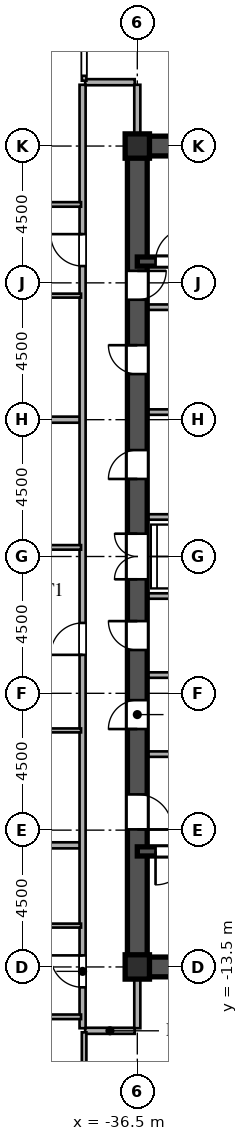
"""IFC4 building model, lengths in metres.
Left out: names, types, materials, properties, quantities, classifications, styles, units other than length and angle.
Written with IfcOpenShell. Run it as: python <this file> out.ifc"""

import sys

from ifc_helpers import new_model, si_unit, direction, frame, frame_2d, origin, origin_2d, place, context, subcontext, project, spatial, rectangle, i_section, extrude, source, transform, mapped, element, fill, save


model = new_model("IFC4")
c1 = context("Model", 3, precision=1e-05, world=origin(), true_north=direction((0.0, 1.0)))
c2 = subcontext(c1, "Body", "Model", "MODEL_VIEW")
j1 = project(units=[si_unit("LENGTHUNIT", "METRE"), si_unit("PLANEANGLEUNIT", "RADIAN")], contexts=[c1])
p1 = place(None, origin())
s1 = spatial("IfcSite", under=j1, at=p1, CompositionType="ELEMENT")
p2 = place(p1, origin())
s2 = spatial("IfcBuilding", under=s1, at=p2, CompositionType="ELEMENT")
p3 = place(p2, frame((0.0, 0.0, 72.9)))
s3 = spatial("IfcBuildingStorey", under=s2, at=p3, CompositionType="ELEMENT", Elevation=72.9)
m1 = source(origin(), c2, "Body", "SweptSolid", [
    extrude(i_section(OverallWidth=0.8, OverallDepth=0.8, WebThickness=0.032, FlangeThickness=0.05, at=origin_2d()), origin(), (0.0, 0.0, 1.0), 3.6),
])
for number, where, z_axis, x_axis in (
    (1, (-36.5, -13.5, 0.0), (0.0, 0.0, 1.0), (1.0, 0.0, 0.0)),
    (2, (-36.5, 13.5, 0.0), (0.0, 0.0, 1.0), (1.0, 0.0, 0.0)),
):
    element("IfcColumn", number, at=place(p3, frame(where, z_axis=z_axis, x_axis=x_axis)), inside=s3, PredefinedType="COLUMN", context=c2, shape_type="MappedRepresentation", body=[
        mapped(m1, transform((0.0, 0.0, 0.0), scale=1.0)),
    ])
for number, where, z_axis, x_axis in (
    (3, (-36.5, -13.5, 0.0), (0.0, 0.0, 1.0), (1.0, 0.0, 0.0)),
    (4, (-36.5, 13.5, 0.0), (0.0, 0.0, 1.0), (1.0, 0.0, 0.0)),
):
    element("IfcWall", number, at=place(p3, frame(where, z_axis=z_axis, x_axis=x_axis)), inside=s3, PredefinedType="SHEAR", context=c2, shape_type="SweptSolid", body=[
        extrude(rectangle(XDim=9.0, YDim=0.65, at=frame_2d((4.5, 0.0))), origin(), (0.0, 0.0, 1.0), 3.38),
    ])
p4 = place(p3, frame((-36.5, -13.65, 0.0), z_axis=(0.0, 0.0, 1.0), x_axis=(0.0, 1.0, 0.0)))
e5 = element("IfcWall", 5, at=p4, inside=s3, PredefinedType="SHEAR", context=c2, shape_type="SweptSolid", body=[
    extrude(rectangle(XDim=7.15, YDim=0.65, at=frame_2d((3.575, 0.0))), origin(), (0.0, 0.0, 1.0), 3.38),
])
p5 = place(p4, frame((4.675, 0.0, 0.0)))
e6 = element("IfcOpeningElement", 6, at=p5, cuts=e5, PredefinedType="OPENING", context=c2, shape_type="SweptSolid", body=[
    extrude(rectangle(XDim=1.15, YDim=2.2, at=frame_2d((0.575, 1.1))), frame((0.0, 0.335, 0.0), z_axis=(0.0, -1.0, 0.0), x_axis=(1.0, 0.0, 0.0)), (0.0, 0.0, 1.0), 0.67),
])
p6 = place(p3, frame((-36.5, -1.3, 0.0), z_axis=(0.0, 0.0, 1.0), x_axis=(0.0, 1.0, 0.0)))
e7 = element("IfcWall", 7, at=p6, inside=s3, PredefinedType="SHEAR", context=c2, shape_type="SweptSolid", body=[
    extrude(rectangle(XDim=2.6, YDim=0.65, at=frame_2d((1.3, 0.0))), origin(), (0.0, 0.0, 1.0), 3.38),
])
p7 = place(p6, frame((0.55, 0.0, 0.0)))
e8 = element("IfcOpeningElement", 8, at=p7, cuts=e7, PredefinedType="OPENING", context=c2, shape_type="SweptSolid", body=[
    extrude(rectangle(XDim=1.5, YDim=2.3, at=frame_2d((0.75, 1.15))), frame((0.0, 0.335, 0.0), z_axis=(0.0, -1.0, 0.0), x_axis=(1.0, 0.0, 0.0)), (0.0, 0.0, 1.0), 0.67),
])
p8 = place(p3, frame((-36.5, 8.2, 0.0), z_axis=(0.0, 0.0, 1.0), x_axis=(0.0, 1.0, 0.0)))
e9 = element("IfcWall", 9, at=p8, inside=s3, PredefinedType="SHEAR", context=c2, shape_type="SweptSolid", body=[
    extrude(rectangle(XDim=5.45, YDim=0.65, at=frame_2d((2.725, 0.0))), origin(), (0.0, 0.0, 1.0), 3.38),
])
p9 = place(p8, frame((0.245, 0.0, 0.0)))
e10 = element("IfcOpeningElement", 10, at=p9, cuts=e9, PredefinedType="OPENING", context=c2, shape_type="SweptSolid", body=[
    extrude(rectangle(XDim=0.95, YDim=2.15, at=frame_2d((0.475, 1.075))), frame((0.0, 0.335, 0.0), z_axis=(0.0, -1.0, 0.0), x_axis=(1.0, 0.0, 0.0)), (0.0, 0.0, 1.0), 0.67),
])
p10 = place(p3, frame((-36.5, -6.5, 0.0), z_axis=(0.0, 0.0, 1.0), x_axis=(0.0, 1.0, 0.0)))
e11 = element("IfcWall", 11, at=p10, inside=s3, PredefinedType="SHEAR", context=c2, shape_type="SweptSolid", body=[
    extrude(rectangle(XDim=2.6, YDim=0.65, at=frame_2d((1.3, 0.0))), origin(), (0.0, 0.0, 1.0), 3.38),
])
p11 = place(p10, frame((0.825, 0.0, 0.0)))
e12 = element("IfcOpeningElement", 12, at=p11, cuts=e11, PredefinedType="OPENING", context=c2, shape_type="SweptSolid", body=[
    extrude(rectangle(XDim=0.95, YDim=2.15, at=frame_2d((0.475, 1.075))), frame((0.0, 0.335, 0.0), z_axis=(0.0, -1.0, 0.0), x_axis=(1.0, 0.0, 0.0)), (0.0, 0.0, 1.0), 0.67),
])
p12 = place(p3, frame((-36.5, -3.9, 0.0), z_axis=(0.0, 0.0, 1.0), x_axis=(0.0, 1.0, 0.0)))
e13 = element("IfcWall", 13, at=p12, inside=s3, PredefinedType="SHEAR", context=c2, shape_type="SweptSolid", body=[
    extrude(rectangle(XDim=2.6, YDim=0.65, at=frame_2d((1.3, 0.0))), origin(), (0.0, 0.0, 1.0), 3.38),
])
p13 = place(p12, frame((0.825, 0.0, 0.0)))
e14 = element("IfcOpeningElement", 14, at=p13, cuts=e13, PredefinedType="OPENING", context=c2, shape_type="SweptSolid", body=[
    extrude(rectangle(XDim=0.95, YDim=2.15, at=frame_2d((0.475, 1.075))), frame((0.0, 0.335, 0.0), z_axis=(0.0, -1.0, 0.0), x_axis=(1.0, 0.0, 0.0)), (0.0, 0.0, 1.0), 0.67),
])
p14 = place(p3, frame((-36.5, 1.3, 0.0), z_axis=(0.0, 0.0, 1.0), x_axis=(0.0, 1.0, 0.0)))
e15 = element("IfcWall", 15, at=p14, inside=s3, PredefinedType="SHEAR", context=c2, shape_type="SweptSolid", body=[
    extrude(rectangle(XDim=3.45, YDim=0.65, at=frame_2d((1.725, 0.0))), origin(), (0.0, 0.0, 1.0), 3.38),
])
p15 = place(p14, frame((1.25, 0.0, 0.0)))
e16 = element("IfcOpeningElement", 16, at=p15, cuts=e15, PredefinedType="OPENING", context=c2, shape_type="SweptSolid", body=[
    extrude(rectangle(XDim=0.95, YDim=2.15, at=frame_2d((0.475, 1.075))), frame((0.0, 0.335, 0.0), z_axis=(0.0, -1.0, 0.0), x_axis=(1.0, 0.0, 0.0)), (0.0, 0.0, 1.0), 0.67),
])
p16 = place(p3, frame((-36.5, 4.75, 0.0), z_axis=(0.0, 0.0, 1.0), x_axis=(0.0, 1.0, 0.0)))
e17 = element("IfcWall", 17, at=p16, inside=s3, PredefinedType="SHEAR", context=c2, shape_type="SweptSolid", body=[
    extrude(rectangle(XDim=3.45, YDim=0.65, at=frame_2d((1.725, 0.0))), origin(), (0.0, 0.0, 1.0), 3.38),
])
p17 = place(p16, frame((1.25, 0.0, 0.0)))
e18 = element("IfcOpeningElement", 18, at=p17, cuts=e17, PredefinedType="OPENING", context=c2, shape_type="SweptSolid", body=[
    extrude(rectangle(XDim=0.95, YDim=2.15, at=frame_2d((0.475, 1.075))), frame((0.0, 0.335, 0.0), z_axis=(0.0, -1.0, 0.0), x_axis=(1.0, 0.0, 0.0)), (0.0, 0.0, 1.0), 0.67),
])
p18 = place(p3, frame((-36.5, -9.7, 0.0), z_axis=(0.0, 0.0, 1.0), x_axis=(1.0, 0.0, 0.0)))
e19 = element("IfcWall", 19, at=p18, inside=s3, PredefinedType="SHEAR", context=c2, shape_type="SweptSolid", body=[
    extrude(rectangle(XDim=9.0, YDim=0.3, at=frame_2d((4.5, 0.0))), origin(), (0.0, 0.0, 1.0), 3.38),
])
p19 = place(p18, frame((0.6, 0.0, 0.0)))
e20 = element("IfcOpeningElement", 20, at=p19, cuts=e19, PredefinedType="OPENING", context=c2, shape_type="SweptSolid", body=[
    extrude(rectangle(XDim=1.1, YDim=2.2, at=frame_2d((0.55, 1.1))), frame((0.0, 0.16, 0.0), z_axis=(0.0, -1.0, 0.0), x_axis=(1.0, 0.0, 0.0)), (0.0, 0.0, 1.0), 0.32),
])
p20 = place(p3, frame((-36.5, 9.7, 0.0), z_axis=(0.0, 0.0, 1.0), x_axis=(1.0, 0.0, 0.0)))
e21 = element("IfcWall", 21, at=p20, inside=s3, PredefinedType="SHEAR", context=c2, shape_type="SweptSolid", body=[
    extrude(rectangle(XDim=9.0, YDim=0.3, at=frame_2d((4.5, 0.0))), origin(), (0.0, 0.0, 1.0), 3.38),
])
p21 = place(p20, frame((0.6, 0.0, 0.0)))
e22 = element("IfcOpeningElement", 22, at=p21, cuts=e21, PredefinedType="OPENING", context=c2, shape_type="SweptSolid", body=[
    extrude(rectangle(XDim=1.1, YDim=2.2, at=frame_2d((0.55, 1.1))), frame((0.0, 0.16, 0.0), z_axis=(0.0, -1.0, 0.0), x_axis=(1.0, 0.0, 0.0)), (0.0, 0.0, 1.0), 0.32),
])
for number, where, z_axis, x_axis in (
    (23, (-36.15, -6.5, 0.0), (0.0, 0.0, 1.0), (1.0, 0.0, 0.0)),
    (24, (-36.15, 8.2, 0.0), (0.0, 0.0, 1.0), (1.0, 0.0, 0.0)),
):
    element("IfcWall", number, at=place(p3, frame(where, z_axis=z_axis, x_axis=x_axis)), inside=s3, PredefinedType="PARTITIONING", context=c2, shape_type="SweptSolid", body=[
        extrude(rectangle(XDim=5.7, YDim=0.18, at=frame_2d((2.85, 0.0))), origin(), (0.0, 0.0, 1.0), 3.38),
    ])
for number, where, z_axis, x_axis in (
    (25, (-36.15, -1.3, 0.0), (0.0, 0.0, 1.0), (1.0, 0.0, 0.0)),
    (26, (-36.15, 1.3, 0.0), (0.0, 0.0, 1.0), (1.0, 0.0, 0.0)),
    (27, (-36.15, -3.9, 0.0), (0.0, 0.0, 1.0), (1.0, 0.0, 0.0)),
    (28, (-36.15, 4.75, 0.0), (0.0, 0.0, 1.0), (1.0, 0.0, 0.0)),
):
    element("IfcWall", number, at=place(p3, frame(where, z_axis=z_axis, x_axis=x_axis)), inside=s3, PredefinedType="PARTITIONING", context=c2, shape_type="SweptSolid", body=[
        extrude(rectangle(XDim=2.95, YDim=0.18, at=frame_2d((1.475, 0.0))), origin(), (0.0, 0.0, 1.0), 3.38),
    ])
p22 = place(p3, frame((-38.215, -15.6, 0.0), z_axis=(0.0, 0.0, 1.0), x_axis=(1.0, 0.0, 0.0)))
e29 = element("IfcWall", 29, at=p22, inside=s3, PredefinedType="PARTITIONING", context=c2, shape_type="SweptSolid", body=[
    extrude(rectangle(XDim=1.63, YDim=0.2, at=frame_2d((0.815, 0.0))), origin(), (0.0, 0.0, 1.0), 3.38),
])
p23 = place(p3, frame((-44.4, -15.14, 0.0), z_axis=(0.0, 0.0, 1.0), x_axis=(1.0, 0.0, 0.0)))
e30 = element("IfcWall", 30, at=p23, inside=s3, PredefinedType="PARTITIONING", context=c2, shape_type="SweptSolid", body=[
    extrude(rectangle(XDim=6.05, YDim=0.15, at=frame_2d((3.025, 0.0))), origin(), (0.0, 0.0, 1.0), 3.38),
])
p24 = place(p23, frame((2.55, 0.0, 0.0)))
e31 = element("IfcOpeningElement", 31, at=p24, cuts=e30, PredefinedType="OPENING", context=c2, shape_type="SweptSolid", body=[
    extrude(rectangle(XDim=0.95, YDim=2.15, at=frame_2d((0.475, 1.075))), frame((0.0, 0.085, 0.0), z_axis=(0.0, -1.0, 0.0), x_axis=(1.0, 0.0, 0.0)), (0.0, 0.0, 1.0), 0.17),
])
p25 = place(p3, frame((-44.4, -12.14, 0.0), z_axis=(0.0, 0.0, 1.0), x_axis=(1.0, 0.0, 0.0)))
e32 = element("IfcWall", 32, at=p25, inside=s3, PredefinedType="PARTITIONING", context=c2, shape_type="SweptSolid", body=[
    extrude(rectangle(XDim=6.05, YDim=0.13, at=frame_2d((3.025, 0.0))), origin(), (0.0, 0.0, 1.0), 3.38),
])
p26 = place(p25, frame((2.585, 0.0, 0.0)))
e33 = element("IfcOpeningElement", 33, at=p26, cuts=e32, PredefinedType="OPENING", context=c2, shape_type="SweptSolid", body=[
    extrude(rectangle(XDim=0.88, YDim=2.1, at=frame_2d((0.44, 1.05))), frame((0.0, 0.075, 0.0), z_axis=(0.0, -1.0, 0.0), x_axis=(1.0, 0.0, 0.0)), (0.0, 0.0, 1.0), 0.15),
])
p27 = place(p3, frame((-66.568, -9.5, 0.0), z_axis=(0.0, 0.0, 1.0), x_axis=(1.0, 0.0, 0.0)))
e34 = element("IfcWall", 34, at=p27, inside=s3, PredefinedType="PARTITIONING", context=c2, shape_type="SweptSolid", body=[
    extrude(rectangle(XDim=28.188, YDim=0.2, at=frame_2d((14.094, 0.0))), origin(), (0.0, 0.0, 1.0), 3.38),
])
p28 = place(p3, frame((-44.4, -5.72, 0.0), z_axis=(0.0, 0.0, 1.0), x_axis=(1.0, 0.0, 0.0)))
e35 = element("IfcWall", 35, at=p28, inside=s3, PredefinedType="PARTITIONING", context=c2, shape_type="SweptSolid", body=[
    extrude(rectangle(XDim=6.05, YDim=0.13, at=frame_2d((3.025, 0.0))), origin(), (0.0, 0.0, 1.0), 3.38),
])
p29 = place(p28, frame((2.585, 0.0, 0.0)))
e36 = element("IfcOpeningElement", 36, at=p29, cuts=e35, PredefinedType="OPENING", context=c2, shape_type="SweptSolid", body=[
    extrude(rectangle(XDim=0.88, YDim=2.1, at=frame_2d((0.44, 1.05))), frame((0.0, 0.075, 0.0), z_axis=(0.0, -1.0, 0.0), x_axis=(1.0, 0.0, 0.0)), (0.0, 0.0, 1.0), 0.15),
])
p30 = place(p3, frame((-44.4, 0.3, 0.0), z_axis=(0.0, 0.0, 1.0), x_axis=(1.0, 0.0, 0.0)))
e37 = element("IfcWall", 37, at=p30, inside=s3, PredefinedType="PARTITIONING", context=c2, shape_type="SweptSolid", body=[
    extrude(rectangle(XDim=6.05, YDim=0.15, at=frame_2d((3.025, 0.0))), origin(), (0.0, 0.0, 1.0), 3.38),
])
p31 = place(p30, frame((2.55, 0.0, 0.0)))
e38 = element("IfcOpeningElement", 38, at=p31, cuts=e37, PredefinedType="OPENING", context=c2, shape_type="SweptSolid", body=[
    extrude(rectangle(XDim=0.95, YDim=2.15, at=frame_2d((0.475, 1.075))), frame((0.0, 0.085, 0.0), z_axis=(0.0, -1.0, 0.0), x_axis=(1.0, 0.0, 0.0)), (0.0, 0.0, 1.0), 0.17),
])
p32 = place(p3, frame((-54.52, 4.5, 0.0), z_axis=(0.0, 0.0, 1.0), x_axis=(1.0, 0.0, 0.0)))
e39 = element("IfcWall", 39, at=p32, inside=s3, PredefinedType="PARTITIONING", context=c2, shape_type="SweptSolid", body=[
    extrude(rectangle(XDim=16.14, YDim=0.2, at=frame_2d((8.07, 0.0))), origin(), (0.0, 0.0, 1.0), 2.68),
])
p33 = place(p3, frame((-44.4, 8.58, 0.0), z_axis=(0.0, 0.0, 1.0), x_axis=(1.0, 0.0, 0.0)))
e40 = element("IfcWall", 40, at=p33, inside=s3, PredefinedType="PARTITIONING", context=c2, shape_type="SweptSolid", body=[
    extrude(rectangle(XDim=6.05, YDim=0.13, at=frame_2d((3.025, 0.0))), origin(), (0.0, 0.0, 1.0), 3.38),
])
p34 = place(p33, frame((2.585, 0.0, 0.0)))
e41 = element("IfcOpeningElement", 41, at=p34, cuts=e40, PredefinedType="OPENING", context=c2, shape_type="SweptSolid", body=[
    extrude(rectangle(XDim=0.88, YDim=2.1, at=frame_2d((0.44, 1.05))), frame((0.0, 0.075, 0.0), z_axis=(0.0, -1.0, 0.0), x_axis=(1.0, 0.0, 0.0)), (0.0, 0.0, 1.0), 0.15),
])
p35 = place(p3, frame((-44.4, 11.58, 0.0), z_axis=(0.0, 0.0, 1.0), x_axis=(1.0, 0.0, 0.0)))
e42 = element("IfcWall", 42, at=p35, inside=s3, PredefinedType="PARTITIONING", context=c2, shape_type="SweptSolid", body=[
    extrude(rectangle(XDim=6.05, YDim=0.15, at=frame_2d((3.025, 0.0))), origin(), (0.0, 0.0, 1.0), 3.38),
])
p36 = place(p35, frame((2.55, 0.0, 0.0)))
e43 = element("IfcOpeningElement", 43, at=p36, cuts=e42, PredefinedType="OPENING", context=c2, shape_type="SweptSolid", body=[
    extrude(rectangle(XDim=0.95, YDim=2.15, at=frame_2d((0.475, 1.075))), frame((0.0, 0.085, 0.0), z_axis=(0.0, -1.0, 0.0), x_axis=(1.0, 0.0, 0.0)), (0.0, 0.0, 1.0), 0.17),
])
p37 = place(p3, frame((-38.215, 15.6, 0.0), z_axis=(0.0, 0.0, 1.0), x_axis=(1.0, 0.0, 0.0)))
e44 = element("IfcWall", 44, at=p37, inside=s3, PredefinedType="PARTITIONING", context=c2, shape_type="SweptSolid", body=[
    extrude(rectangle(XDim=1.63, YDim=0.2, at=frame_2d((0.815, 0.0))), origin(), (0.0, 0.0, 1.0), 3.38),
])
p38 = place(p3, frame((-38.3, -15.515, 0.0), z_axis=(0.0, 0.0, 1.0), x_axis=(0.0, 1.0, 0.0)))
e45 = element("IfcWall", 45, at=p38, inside=s3, PredefinedType="PARTITIONING", context=c2, shape_type="SweptSolid", body=[
    extrude(rectangle(XDim=31.03, YDim=0.2, at=frame_2d((15.515, 0.0))), origin(), (0.0, 0.0, 1.0), 3.38),
])
p39 = place(p38, frame((1.345, 0.0, 0.0)))
e46 = element("IfcOpeningElement", 46, at=p39, cuts=e45, PredefinedType="OPENING", context=c2, shape_type="SweptSolid", body=[
    extrude(rectangle(XDim=1.05, YDim=2.25, at=frame_2d((0.525, 1.125))), frame((0.0, 0.11, 0.0), z_axis=(0.0, -1.0, 0.0), x_axis=(1.0, 0.0, 0.0)), (0.0, 0.0, 1.0), 0.22),
])
p40 = place(p38, frame((12.28, 0.0, 0.0)))
e47 = element("IfcOpeningElement", 47, at=p40, cuts=e45, PredefinedType="OPENING", context=c2, shape_type="SweptSolid", body=[
    extrude(rectangle(XDim=1.05, YDim=2.25, at=frame_2d((0.525, 1.125))), frame((0.0, 0.11, 0.0), z_axis=(0.0, -1.0, 0.0), x_axis=(1.0, 0.0, 0.0)), (0.0, 0.0, 1.0), 0.22),
])
p41 = place(p38, frame((25.067, 0.0, 0.0)))
e48 = element("IfcOpeningElement", 48, at=p41, cuts=e45, PredefinedType="OPENING", context=c2, shape_type="SweptSolid", body=[
    extrude(rectangle(XDim=1.05, YDim=2.25, at=frame_2d((0.525, 1.125))), frame((0.0, 0.11, 0.0), z_axis=(0.0, -1.0, 0.0), x_axis=(1.0, 0.0, 0.0)), (0.0, 0.0, 1.0), 0.22),
])
p42 = place(p3, frame((-38.25, -22.273, 0.0), z_axis=(0.0, 0.0, 1.0), x_axis=(0.0, 1.0, 0.0)))
e49 = element("IfcWall", 49, at=p42, inside=s3, PredefinedType="PARTITIONING", context=c2, shape_type="SweptSolid", body=[
    extrude(rectangle(XDim=6.623, YDim=0.15, at=frame_2d((3.312, 0.0))), origin(), (0.0, 0.0, 1.0), 3.38),
])
p43 = place(p42, frame((0.929, 0.0, 0.0)))
e50 = element("IfcOpeningElement", 50, at=p43, cuts=e49, PredefinedType="OPENING", context=c2, shape_type="SweptSolid", body=[
    extrude(rectangle(XDim=0.95, YDim=2.15, at=frame_2d((0.475, 1.075))), frame((0.0, 0.085, 0.0), z_axis=(0.0, -1.0, 0.0), x_axis=(1.0, 0.0, 0.0)), (0.0, 0.0, 1.0), 0.17),
])
p44 = place(p42, frame((4.248, 0.0, 0.0)))
e51 = element("IfcOpeningElement", 51, at=p44, cuts=e49, PredefinedType="OPENING", context=c2, shape_type="SweptSolid", body=[
    extrude(rectangle(XDim=0.95, YDim=2.15, at=frame_2d((0.475, 1.075))), frame((0.0, 0.085, 0.0), z_axis=(0.0, -1.0, 0.0), x_axis=(1.0, 0.0, 0.0)), (0.0, 0.0, 1.0), 0.17),
])
p45 = place(p3, frame((-38.25, 15.65, 0.0), z_axis=(0.0, 0.0, 1.0), x_axis=(0.0, 1.0, 0.0)))
e52 = element("IfcWall", 52, at=p45, inside=s3, PredefinedType="PARTITIONING", context=c2, shape_type="SweptSolid", body=[
    extrude(rectangle(XDim=6.623, YDim=0.15, at=frame_2d((3.312, 0.0))), origin(), (0.0, 0.0, 1.0), 3.38),
])
p46 = place(p45, frame((0.16, 0.0, 0.0)))
e53 = element("IfcOpeningElement", 53, at=p46, cuts=e52, PredefinedType="OPENING", context=c2, shape_type="SweptSolid", body=[
    extrude(rectangle(XDim=0.95, YDim=2.15, at=frame_2d((0.475, 1.075))), frame((0.0, 0.085, 0.0), z_axis=(0.0, -1.0, 0.0), x_axis=(1.0, 0.0, 0.0)), (0.0, 0.0, 1.0), 0.17),
])
for number, where, z_axis, x_axis in (
    (54, (-36.5, -15.515, 0.0), (0.0, 0.0, 1.0), (0.0, 1.0, 0.0)),
    (55, (-36.5, 13.83, 0.0), (0.0, 0.0, 1.0), (0.0, 1.0, 0.0)),
):
    element("IfcWall", number, at=place(p3, frame(where, z_axis=z_axis, x_axis=x_axis)), inside=s3, PredefinedType="PARTITIONING", context=c2, shape_type="SweptSolid", body=[
        extrude(rectangle(XDim=1.685, YDim=0.2, at=frame_2d((0.842, 0.0))), origin(), (0.0, 0.0, 1.0), 2.68),
    ])
m2 = source(origin(), c2, "Body", "SweptSolid", [
    extrude(rectangle(XDim=1.15, YDim=2.2, at=frame_2d((0.575, 1.1))), frame((0.0, 0.025, 0.0), z_axis=(0.0, -1.0, 0.0), x_axis=(1.0, 0.0, 0.0)), (0.0, 0.0, 1.0), 0.05),
])
p47 = place(p5, frame((1.15, 0.0, 0.0), z_axis=(0.0, 0.0, 1.0), x_axis=(-1.0, 0.0, 0.0)))
e56 = element("IfcDoor", 56, at=p47, inside=s3, OperationType="SINGLE_SWING_LEFT", PredefinedType="DOOR", context=c2, shape_type="MappedRepresentation", body=[
    mapped(m2, transform((0.0, 0.0, 0.0), scale=1.0)),
])
fill(e6, e56)
m3 = source(origin(), c2, "Body", "SweptSolid", [
    extrude(rectangle(XDim=1.5, YDim=2.3, at=frame_2d((0.75, 1.15))), frame((0.0, 0.025, 0.0), z_axis=(0.0, -1.0, 0.0), x_axis=(1.0, 0.0, 0.0)), (0.0, 0.0, 1.0), 0.05),
])
p48 = place(p7, origin())
e57 = element("IfcDoor", 57, at=p48, inside=s3, OperationType="DOUBLE_SWING_LEFT", PredefinedType="DOOR", context=c2, shape_type="MappedRepresentation", body=[
    mapped(m3, transform((0.0, 0.0, 0.0), scale=1.0)),
])
fill(e8, e57)
m4 = source(origin(), c2, "Body", "SweptSolid", [
    extrude(rectangle(XDim=0.95, YDim=2.15, at=frame_2d((0.475, 1.075))), frame((0.0, 0.025, 0.0), z_axis=(0.0, -1.0, 0.0), x_axis=(1.0, 0.0, 0.0)), (0.0, 0.0, 1.0), 0.05),
])
p49 = place(p9, frame((0.95, 0.0, 0.0), z_axis=(0.0, 0.0, 1.0), x_axis=(-1.0, 0.0, 0.0)))
e58 = element("IfcDoor", 58, at=p49, inside=s3, OperationType="SINGLE_SWING_RIGHT", PredefinedType="DOOR", context=c2, shape_type="MappedRepresentation", body=[
    mapped(m4, transform((0.0, 0.0, 0.0), scale=1.0)),
])
fill(e10, e58)
p50 = place(p11, origin())
e59 = element("IfcDoor", 59, at=p50, inside=s3, OperationType="SINGLE_SWING_LEFT", PredefinedType="DOOR", context=c2, shape_type="MappedRepresentation", body=[
    mapped(m4, transform((0.0, 0.0, 0.0), scale=1.0)),
])
fill(e12, e59)
p51 = place(p13, origin())
e60 = element("IfcDoor", 60, at=p51, inside=s3, OperationType="SINGLE_SWING_RIGHT", PredefinedType="DOOR", context=c2, shape_type="MappedRepresentation", body=[
    mapped(m4, transform((0.0, 0.0, 0.0), scale=1.0)),
])
fill(e14, e60)
p52 = place(p15, origin())
e61 = element("IfcDoor", 61, at=p52, inside=s3, OperationType="SINGLE_SWING_LEFT", PredefinedType="DOOR", context=c2, shape_type="MappedRepresentation", body=[
    mapped(m4, transform((0.0, 0.0, 0.0), scale=1.0)),
])
fill(e16, e61)
p53 = place(p17, origin())
e62 = element("IfcDoor", 62, at=p53, inside=s3, OperationType="SINGLE_SWING_RIGHT", PredefinedType="DOOR", context=c2, shape_type="MappedRepresentation", body=[
    mapped(m4, transform((0.0, 0.0, 0.0), scale=1.0)),
])
fill(e18, e62)
m5 = source(origin(), c2, "Body", "SweptSolid", [
    extrude(rectangle(XDim=1.1, YDim=2.2, at=frame_2d((0.55, 1.1))), frame((0.0, 0.025, 0.0), z_axis=(0.0, -1.0, 0.0), x_axis=(1.0, 0.0, 0.0)), (0.0, 0.0, 1.0), 0.05),
])
p54 = place(p19, frame((1.1, 0.0, 0.0), z_axis=(0.0, 0.0, 1.0), x_axis=(-1.0, 0.0, 0.0)))
e63 = element("IfcDoor", 63, at=p54, inside=s3, OperationType="SINGLE_SWING_LEFT", PredefinedType="DOOR", context=c2, shape_type="MappedRepresentation", body=[
    mapped(m5, transform((0.0, 0.0, 0.0), scale=1.0)),
])
fill(e20, e63)
p55 = place(p21, origin())
e64 = element("IfcDoor", 64, at=p55, inside=s3, OperationType="SINGLE_SWING_RIGHT", PredefinedType="DOOR", context=c2, shape_type="MappedRepresentation", body=[
    mapped(m5, transform((0.0, 0.0, 0.0), scale=1.0)),
])
fill(e22, e64)
m6 = source(origin(), c2, "Body", "SweptSolid", [
    extrude(rectangle(XDim=1.05, YDim=2.25, at=frame_2d((0.525, 1.125))), frame((0.0, 0.025, 0.0), z_axis=(0.0, -1.0, 0.0), x_axis=(1.0, 0.0, 0.0)), (0.0, 0.0, 1.0), 0.05),
])
p56 = place(p39, origin())
e65 = element("IfcDoor", 65, at=p56, inside=s3, OperationType="SINGLE_SWING_RIGHT", PredefinedType="DOOR", context=c2, shape_type="MappedRepresentation", body=[
    mapped(m6, transform((0.0, 0.0, 0.0), scale=1.0)),
])
fill(e46, e65)
p57 = place(p40, origin())
e66 = element("IfcDoor", 66, at=p57, inside=s3, OperationType="SINGLE_SWING_LEFT", PredefinedType="DOOR", context=c2, shape_type="MappedRepresentation", body=[
    mapped(m6, transform((0.0, 0.0, 0.0), scale=1.0)),
])
fill(e47, e66)
p58 = place(p41, origin())
e67 = element("IfcDoor", 67, at=p58, inside=s3, OperationType="SINGLE_SWING_RIGHT", PredefinedType="DOOR", context=c2, shape_type="MappedRepresentation", body=[
    mapped(m6, transform((0.0, 0.0, 0.0), scale=1.0)),
])
fill(e48, e67)
save(model, sys.argv[1])
